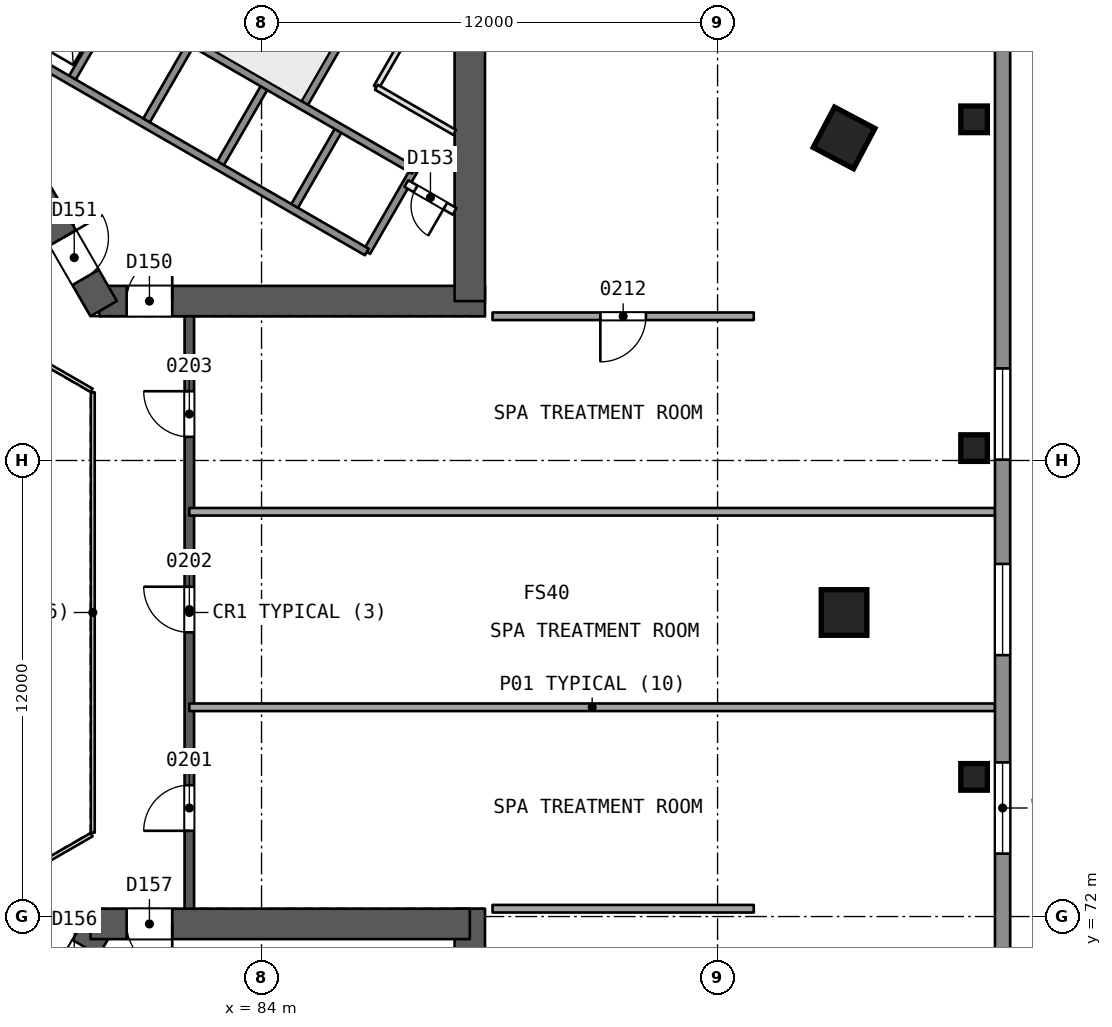
"""IFC4 building model, lengths in metres.
Left out: names, types, materials, properties, quantities, classifications, styles, units other than length and angle.
Written with IfcOpenShell. Run it as: python <this file> out.ifc"""

import sys

from ifc_helpers import new_model, si_unit, direction, frame, frame_2d, origin, origin_2d, place, context, subcontext, project, spatial, rectangle, extrude, element, fill, save


model = new_model("IFC4")
c1 = context("Model", 3, precision=1e-05, world=origin(), true_north=direction((0.0, 1.0)))
c2 = subcontext(c1, "Body", "Model", "MODEL_VIEW")
j1 = project(units=[si_unit("LENGTHUNIT", "METRE"), si_unit("PLANEANGLEUNIT", "RADIAN")], contexts=[c1])
p1 = place(None, origin())
s1 = spatial("IfcSite", under=j1, at=p1, CompositionType="ELEMENT")
p2 = place(p1, origin())
s2 = spatial("IfcBuilding", under=s1, at=p2, CompositionType="ELEMENT")
p3 = place(p2, frame((0.0, 0.0, 15.0)))
s3 = spatial("IfcBuildingStorey", under=s2, at=p3, CompositionType="ELEMENT", Elevation=15.0)
p4 = place(p3, frame((79.731, 88.194, 0.0), z_axis=(0.0, 0.0, 1.0), x_axis=(1.0, 0.0, 0.0)))
e1 = element("IfcWall", 1, at=p4, inside=s3, PredefinedType="SHEAR", context=c2, shape_type="SweptSolid", body=[
    extrude(rectangle(XDim=10.149, YDim=0.8, at=frame_2d((5.074, 0.0))), origin(), (0.0, 0.0, 1.0), 5.4),
])
p5 = place(p4, frame((0.719, 0.0, 0.0)))
e2 = element("IfcOpeningElement", 2, at=p5, cuts=e1, PredefinedType="OPENING", context=c2, shape_type="SweptSolid", body=[
    extrude(rectangle(XDim=1.2, YDim=2.1, at=frame_2d((0.6, 1.05))), frame((0.0, 0.411, 0.0), z_axis=(0.0, -1.0, 0.0), x_axis=(1.0, 0.0, 0.0)), (0.0, 0.0, 1.0), 0.821),
])
p6 = place(p3, frame((89.48, 88.194, 0.0), z_axis=(0.0, 0.0, 1.0), x_axis=(0.0, 1.0, 0.0)))
e3 = element("IfcWall", 3, at=p6, inside=s3, PredefinedType="SHEAR", context=c2, shape_type="SweptSolid", body=[
    extrude(rectangle(XDim=13.933, YDim=0.8, at=frame_2d((6.967, 0.0))), origin(), (0.0, 0.0, 1.0), 5.4),
])
p7 = place(p3, frame((74.856, 96.637, 0.0), z_axis=(0.0, 0.0, 1.0), x_axis=(0.499993500917, -0.866029155999, 0.0)))
e4 = element("IfcWall", 4, at=p7, inside=s3, PredefinedType="SHEAR", context=c2, shape_type="SweptSolid", body=[
    extrude(rectangle(XDim=9.98, YDim=0.8, at=frame_2d((4.99, 0.0))), origin(), (0.0, 0.0, 1.0), 5.4),
])
p8 = place(p7, frame((7.83, 0.0, 0.0)))
e5 = element("IfcOpeningElement", 5, at=p8, cuts=e4, PredefinedType="OPENING", context=c2, shape_type="SweptSolid", body=[
    extrude(rectangle(XDim=1.2, YDim=2.1, at=frame_2d((0.6, 1.05))), frame((0.0, 0.411, 0.0), z_axis=(0.0, -1.0, 0.0), x_axis=(1.0, 0.0, 0.0)), (0.0, 0.0, 1.0), 0.821),
])
p9 = place(p3, frame((79.731, 71.806, 0.0), z_axis=(0.0, 0.0, 1.0), x_axis=(-0.49999662545, -0.866027352073, 0.0)))
e6 = element("IfcWall", 6, at=p9, inside=s3, PredefinedType="SHEAR", context=c2, shape_type="SweptSolid", body=[
    extrude(rectangle(XDim=10.149, YDim=0.8, at=frame_2d((5.074, 0.0))), origin(), (0.0, 0.0, 1.0), 5.4),
])
p10 = place(p9, frame((0.719, 0.0, 0.0)))
e7 = element("IfcOpeningElement", 7, at=p10, cuts=e6, PredefinedType="OPENING", context=c2, shape_type="SweptSolid", body=[
    extrude(rectangle(XDim=1.2, YDim=2.1, at=frame_2d((0.6, 1.05))), frame((0.0, 0.411, 0.0), z_axis=(0.0, -1.0, 0.0), x_axis=(1.0, 0.0, 0.0)), (0.0, 0.0, 1.0), 0.821),
])
p11 = place(p3, frame((89.48, 58.103, 0.0), z_axis=(0.0, 0.0, 1.0), x_axis=(0.0, 1.0, 0.0)))
e8 = element("IfcWall", 8, at=p11, inside=s3, PredefinedType="SHEAR", context=c2, shape_type="SweptSolid", body=[
    extrude(rectangle(XDim=14.103, YDim=0.8, at=frame_2d((7.051, 0.0))), origin(), (0.0, 0.0, 1.0), 5.4),
])
p12 = place(p3, frame((89.48, 71.806, 0.0), z_axis=(0.0, 0.0, 1.0), x_axis=(-1.0, 0.0, 0.0)))
e9 = element("IfcWall", 9, at=p12, inside=s3, PredefinedType="SHEAR", context=c2, shape_type="SweptSolid", body=[
    extrude(rectangle(XDim=9.98, YDim=0.8, at=frame_2d((4.99, 0.0))), origin(), (0.0, 0.0, 1.0), 5.4),
])
p13 = place(p12, frame((7.83, 0.0, 0.0)))
e10 = element("IfcOpeningElement", 10, at=p13, cuts=e9, PredefinedType="OPENING", context=c2, shape_type="SweptSolid", body=[
    extrude(rectangle(XDim=1.2, YDim=2.1, at=frame_2d((0.6, 1.05))), frame((0.0, 0.411, 0.0), z_axis=(0.0, -1.0, 0.0), x_axis=(1.0, 0.0, 0.0)), (0.0, 0.0, 1.0), 0.821),
])
p14 = place(p3, frame((82.1, 72.206, 0.0), z_axis=(0.0, 0.0, 1.0), x_axis=(0.0, 1.0, 0.0)))
e11 = element("IfcWall", 11, at=p14, inside=s3, PredefinedType="SHEAR", context=c2, shape_type="SweptSolid", body=[
    extrude(rectangle(XDim=15.588, YDim=0.25, at=frame_2d((7.794, 0.0))), origin(), (0.0, 0.0, 1.0), 5.0),
])
p15 = place(p14, frame((2.05, 0.0, 0.0)))
e12 = element("IfcOpeningElement", 12, at=p15, cuts=e11, PredefinedType="OPENING", context=c2, shape_type="SweptSolid", body=[
    extrude(rectangle(XDim=1.2, YDim=2.4, at=frame_2d((0.6, 1.2))), frame((0.0, 0.135, 0.0), z_axis=(0.0, -1.0, 0.0), x_axis=(1.0, 0.0, 0.0)), (0.0, 0.0, 1.0), 0.271),
])
p16 = place(p14, frame((7.272, 0.0, 0.0)))
e13 = element("IfcOpeningElement", 13, at=p16, cuts=e11, PredefinedType="OPENING", context=c2, shape_type="SweptSolid", body=[
    extrude(rectangle(XDim=1.2, YDim=2.4, at=frame_2d((0.6, 1.2))), frame((0.0, 0.135, 0.0), z_axis=(0.0, -1.0, 0.0), x_axis=(1.0, 0.0, 0.0)), (0.0, 0.0, 1.0), 0.271),
])
p17 = place(p14, frame((12.417, 0.0, 0.0)))
e14 = element("IfcOpeningElement", 14, at=p17, cuts=e11, PredefinedType="OPENING", context=c2, shape_type="SweptSolid", body=[
    extrude(rectangle(XDim=1.2, YDim=2.4, at=frame_2d((0.6, 1.2))), frame((0.0, 0.135, 0.0), z_axis=(0.0, -1.0, 0.0), x_axis=(1.0, 0.0, 0.0)), (0.0, 0.0, 1.0), 0.271),
])
p18 = place(p3, frame((99.353, 80.0, 0.0), z_axis=(-0.020160473534, 0.0, 0.999796757), x_axis=(0.0, -1.0, 0.0)))
e15 = element("IfcColumn", 15, at=p18, inside=s3, PredefinedType="COLUMN", context=c2, shape_type="SweptSolid", body=[
    extrude(rectangle(XDim=1.2, YDim=1.2, at=origin_2d()), origin(), (0.0, 0.0, 1.0), 5.401),
])
p19 = place(p3, frame((99.353, 92.5, 0.0), z_axis=(-0.020159326465, -0.010667266919, 0.999739871653), x_axis=(0.999796447908, 0.00060008046, 0.020166870185)))
e16 = element("IfcColumn", 16, at=p19, inside=s3, PredefinedType="COLUMN", context=c2, shape_type="SweptSolid", body=[
    extrude(rectangle(XDim=1.2, YDim=1.2, at=origin_2d()), origin(), (0.0, 0.0, 1.0), 5.401),
])
for number, where, z_axis, x_axis in (
    (17, (102.75, 75.674, 0.0), (0.0, 0.0, 1.0), (1.0, 0.0, 0.0)),
    (18, (102.75, 84.326, 0.0), (0.0, 0.0, 1.0), (1.0, 0.0, 0.0)),
    (19, (102.75, 92.977, 0.0), (0.0, 0.0, 1.0), (1.0, 0.0, 0.0)),
):
    element("IfcColumn", number, at=place(p3, frame(where, z_axis=z_axis, x_axis=x_axis)), inside=s3, PredefinedType="COLUMN", context=c2, shape_type="SweptSolid", body=[
        extrude(rectangle(XDim=0.7, YDim=0.7, at=origin_2d()), origin(), (0.0, 0.0, 1.0), 5.4),
    ])
p20 = place(p3, frame((103.301, 77.506, 0.0), z_axis=(0.0, 0.0, 1.0), x_axis=(-1.0, 0.0, 0.0)))
e20 = element("IfcWall", 20, at=p20, inside=s3, PredefinedType="PARTITIONING", context=c2, shape_type="SweptSolid", body=[
    extrude(rectangle(XDim=21.201, YDim=0.2, at=frame_2d((10.601, 0.0))), origin(), (0.0, 0.0, 1.0), 5.0),
])
p21 = place(p3, frame((90.079, 72.206, 0.0), z_axis=(0.0, 0.0, 1.0), x_axis=(1.0, 0.0, 0.0)))
e21 = element("IfcWall", 21, at=p21, inside=s3, PredefinedType="PARTITIONING", context=c2, shape_type="SweptSolid", body=[
    extrude(rectangle(XDim=6.874, YDim=0.2, at=frame_2d((3.437, 0.0))), origin(), (0.0, 0.0, 1.0), 5.0),
])
p22 = place(p3, frame((103.301, 82.65, 0.0), z_axis=(0.0, 0.0, 1.0), x_axis=(-1.0, 0.0, 0.0)))
e22 = element("IfcWall", 22, at=p22, inside=s3, PredefinedType="PARTITIONING", context=c2, shape_type="SweptSolid", body=[
    extrude(rectangle(XDim=21.201, YDim=0.2, at=frame_2d((10.601, 0.0))), origin(), (0.0, 0.0, 1.0), 5.0),
])
p23 = place(p3, frame((96.953, 87.794, 0.0), z_axis=(0.0, 0.0, 1.0), x_axis=(-1.0, 0.0, 0.0)))
e23 = element("IfcWall", 23, at=p23, inside=s3, PredefinedType="PARTITIONING", context=c2, shape_type="SweptSolid", body=[
    extrude(rectangle(XDim=6.874, YDim=0.2, at=frame_2d((3.437, 0.0))), origin(), (0.0, 0.0, 1.0), 5.0),
])
p24 = place(p23, frame((2.837, 0.0, 0.0)))
e24 = element("IfcOpeningElement", 24, at=p24, cuts=e23, PredefinedType="OPENING", context=c2, shape_type="SweptSolid", body=[
    extrude(rectangle(XDim=1.2, YDim=2.4, at=frame_2d((0.6, 1.2))), frame((0.0, 0.11, 0.0), z_axis=(0.0, -1.0, 0.0), x_axis=(1.0, 0.0, 0.0)), (0.0, 0.0, 1.0), 0.221),
])
p25 = place(p3, frame((103.5, 119.364, 0.0), z_axis=(0.0, 0.0, 1.0), x_axis=(0.0, -1.0, 0.0)))
e25 = element("IfcWall", 25, at=p25, inside=s3, PredefinedType="SOLIDWALL", context=c2, shape_type="SweptSolid", body=[
    extrude(rectangle(XDim=78.727, YDim=0.4, at=frame_2d((39.364, 0.0))), origin(), (0.0, 0.0, 1.0), 5.0),
])
p26 = place(p25, frame((43.308, 0.0, 0.9)))
e26 = element("IfcOpeningElement", 26, at=p26, cuts=e25, PredefinedType="OPENING", context=c2, shape_type="SweptSolid", body=[
    extrude(rectangle(XDim=2.4, YDim=2.4, at=frame_2d((1.2, 1.2))), frame((0.0, 0.21, 0.0), z_axis=(0.0, -1.0, 0.0), x_axis=(1.0, 0.0, 0.0)), (0.0, 0.0, 1.0), 0.421),
])
p27 = place(p25, frame((38.085, 0.0, 0.9)))
e27 = element("IfcOpeningElement", 27, at=p27, cuts=e25, PredefinedType="OPENING", context=c2, shape_type="SweptSolid", body=[
    extrude(rectangle(XDim=2.4, YDim=2.4, at=frame_2d((1.2, 1.2))), frame((0.0, 0.21, 0.0), z_axis=(0.0, -1.0, 0.0), x_axis=(1.0, 0.0, 0.0)), (0.0, 0.0, 1.0), 0.421),
])
p28 = place(p25, frame((32.941, 0.0, 0.9)))
e28 = element("IfcOpeningElement", 28, at=p28, cuts=e25, PredefinedType="OPENING", context=c2, shape_type="SweptSolid", body=[
    extrude(rectangle(XDim=2.4, YDim=2.4, at=frame_2d((1.2, 1.2))), frame((0.0, 0.21, 0.0), z_axis=(0.0, -1.0, 0.0), x_axis=(1.0, 0.0, 0.0)), (0.0, 0.0, 1.0), 0.421),
])
p29 = place(p3, frame((26.66, 85.0, 0.0), z_axis=(0.0, 0.0, 1.0), x_axis=(0.866025599265, 0.499999661418, 0.0)))
e29 = element("IfcWall", 29, at=p29, inside=s3, PredefinedType="SOLIDWALL", context=c2, shape_type="SweptSolid", body=[
    extrude(rectangle(XDim=78.727, YDim=0.4, at=frame_2d((39.364, 0.0))), origin(), (0.0, 0.0, 1.0), 5.0),
])
p30 = place(p29, frame((42.061, 0.0, 0.9)))
e30 = element("IfcOpeningElement", 30, at=p30, cuts=e29, PredefinedType="OPENING", context=c2, shape_type="SweptSolid", body=[
    extrude(rectangle(XDim=2.4, YDim=2.4, at=frame_2d((1.2, 1.2))), frame((0.0, 0.21, 0.0), z_axis=(0.0, -1.0, 0.0), x_axis=(1.0, 0.0, 0.0)), (0.0, 0.0, 1.0), 0.421),
])
p31 = place(p29, frame((34.267, 0.0, 0.9)))
e31 = element("IfcOpeningElement", 31, at=p31, cuts=e29, PredefinedType="OPENING", context=c2, shape_type="SweptSolid", body=[
    extrude(rectangle(XDim=2.4, YDim=2.4, at=frame_2d((1.2, 1.2))), frame((0.0, 0.21, 0.0), z_axis=(0.0, -1.0, 0.0), x_axis=(1.0, 0.0, 0.0)), (0.0, 0.0, 1.0), 0.421),
])
p32 = place(p3, frame((94.84, 35.636, 0.0), z_axis=(0.0, 0.0, 1.0), x_axis=(-0.866025599265, 0.499999661418, 0.0)))
e32 = element("IfcWall", 32, at=p32, inside=s3, PredefinedType="SOLIDWALL", context=c2, shape_type="SweptSolid", body=[
    extrude(rectangle(XDim=78.727, YDim=0.4, at=frame_2d((39.364, 0.0))), origin(), (0.0, 0.0, 1.0), 5.0),
])
p33 = place(p32, frame((42.061, 0.0, 0.9)))
e33 = element("IfcOpeningElement", 33, at=p33, cuts=e32, PredefinedType="OPENING", context=c2, shape_type="SweptSolid", body=[
    extrude(rectangle(XDim=2.4, YDim=2.4, at=frame_2d((1.2, 1.2))), frame((0.0, 0.21, 0.0), z_axis=(0.0, -1.0, 0.0), x_axis=(1.0, 0.0, 0.0)), (0.0, 0.0, 1.0), 0.421),
])
p34 = place(p3, frame((86.77, 89.486, 0.0), z_axis=(0.0, 0.0, 1.0), x_axis=(0.499961042966, 0.86604789447, 0.0)))
e34 = element("IfcWall", 34, at=p34, inside=s3, PredefinedType="SOLIDWALL", context=c2, shape_type="SweptSolid", body=[
    extrude(rectangle(XDim=2.48, YDim=0.2, at=frame_2d((1.24, 0.0))), origin(), (0.0, 0.0, 1.0), 5.0),
])
p35 = place(p3, frame((87.021, 93.821, 0.0), z_axis=(0.0, 0.0, 1.0), x_axis=(0.500028662945, 0.866008854593, 0.0)))
e35 = element("IfcWall", 35, at=p35, inside=s3, PredefinedType="PARTITIONING", context=c2, shape_type="SweptSolid", body=[
    extrude(rectangle(XDim=4.118, YDim=0.15, at=frame_2d((2.059, 0.0))), origin(), (0.0, 0.0, 1.0), 5.0),
])
p36 = place(p35, frame((1.582, 0.0, 0.0)))
e36 = element("IfcOpeningElement", 36, at=p36, cuts=e35, PredefinedType="OPENING", context=c2, shape_type="SweptSolid", body=[
    extrude(rectangle(XDim=0.9, YDim=2.1, at=frame_2d((0.45, 1.05))), frame((0.0, 0.085, 0.0), z_axis=(0.0, -1.0, 0.0), x_axis=(1.0, 0.0, 0.0)), (0.0, 0.0, 1.0), 0.171),
])
p37 = place(p3, frame((84.821, 90.611, 0.0), z_axis=(0.0, 0.0, 1.0), x_axis=(0.499961042966, 0.86604789447, 0.0)))
e37 = element("IfcWall", 37, at=p37, inside=s3, PredefinedType="SOLIDWALL", context=c2, shape_type="SweptSolid", body=[
    extrude(rectangle(XDim=2.48, YDim=0.2, at=frame_2d((1.24, 0.0))), origin(), (0.0, 0.0, 1.0), 5.0),
])
p38 = place(p3, frame((85.087, 93.321, 0.0), z_axis=(0.0, 0.0, 1.0), x_axis=(0.500019787375, 0.866013979237, 0.0)))
e38 = element("IfcWall", 38, at=p38, inside=s3, PredefinedType="SOLIDWALL", context=c2, shape_type="SweptSolid", body=[
    extrude(rectangle(XDim=7.7, YDim=0.2, at=frame_2d((3.85, 0.0))), origin(), (0.0, 0.0, 1.0), 5.0),
])
for number, where, z_axis, x_axis in (
    (39, (82.873, 91.736, 0.0), (0.0, 0.0, 1.0), (0.5, 0.866, 0.0)),
    (40, (80.924, 92.861, 0.0), (0.0, 0.0, 1.0), (0.5, 0.866, 0.0)),
):
    element("IfcWall", number, at=place(p3, frame(where, z_axis=z_axis, x_axis=x_axis)), inside=s3, PredefinedType="SOLIDWALL", context=c2, shape_type="SweptSolid", body=[
        extrude(rectangle(XDim=2.48, YDim=0.2, at=frame_2d((1.24, 0.0))), origin(), (0.0, 0.0, 1.0), 5.0),
    ])
p39 = place(p3, frame((78.976, 93.986, 0.0), z_axis=(0.0, 0.0, 1.0), x_axis=(0.499944174705, 0.866057632134, 0.0)))
e41 = element("IfcWall", 41, at=p39, inside=s3, PredefinedType="SOLIDWALL", context=c2, shape_type="SweptSolid", body=[
    extrude(rectangle(XDim=3.05, YDim=0.2, at=frame_2d((1.525, 0.0))), origin(), (0.0, 0.0, 1.0), 5.0),
])
p40 = place(p3, frame((86.77, 89.486, 0.0), z_axis=(0.0, 0.0, 1.0), x_axis=(-0.86601811187, 0.500012629753, 0.0)))
e42 = element("IfcWall", 42, at=p40, inside=s3, PredefinedType="SOLIDWALL", context=c2, shape_type="SweptSolid", body=[
    extrude(rectangle(XDim=10.9, YDim=0.2, at=frame_2d((5.45, 0.0))), origin(), (0.0, 0.0, 1.0), 5.0),
])
p41 = place(p3, frame((89.08, 90.554, 0.0), z_axis=(0.0, 0.0, 1.0), x_axis=(-0.866022048785, 0.500005810984, 0.0)))
e43 = element("IfcWall", 43, at=p41, inside=s3, PredefinedType="PARTITIONING", context=c2, shape_type="SweptSolid", body=[
    extrude(rectangle(XDim=1.467, YDim=0.2, at=frame_2d((0.733, 0.0))), origin(), (0.0, 0.0, 1.0), 5.0),
])
p42 = place(p41, frame((0.283, 0.0, 0.0)))
e44 = element("IfcOpeningElement", 44, at=p42, cuts=e43, PredefinedType="OPENING", context=c2, shape_type="SweptSolid", body=[
    extrude(rectangle(XDim=0.9, YDim=2.1, at=frame_2d((0.45, 1.05))), frame((0.0, 0.11, 0.0), z_axis=(0.0, -1.0, 0.0), x_axis=(1.0, 0.0, 0.0)), (0.0, 0.0, 1.0), 0.221),
])
p43 = place(p3, frame((88.01, 91.634, 0.0), z_axis=(0.0, 0.0, 1.0), x_axis=(-0.866024315419, 0.5000018851, 0.0)))
e45 = element("IfcWall", 45, at=p43, inside=s3, PredefinedType="SOLIDWALL", context=c2, shape_type="SweptSolid", body=[
    extrude(rectangle(XDim=9.0, YDim=0.2, at=frame_2d((4.5, 0.0))), origin(), (0.0, 0.0, 1.0), 5.0),
])
p44 = place(p3, frame((89.08, 92.632, 0.0), z_axis=(0.0, 0.0, 1.0), x_axis=(-0.866041951395, 0.499971337603, 0.0)))
e46 = element("IfcWall", 46, at=p44, inside=s3, PredefinedType="PARTITIONING", context=c2, shape_type="SweptSolid", body=[
    extrude(rectangle(XDim=2.378, YDim=0.15, at=frame_2d((1.189, 0.0))), origin(), (0.0, 0.0, 1.0), 5.0),
])
p45 = place(p3, frame((79.56, 74.206, 0.0), z_axis=(0.0, 0.0, 1.0), x_axis=(0.0, 1.0, 0.0)))
e47 = element("IfcWall", 47, at=p45, inside=s3, PredefinedType="PARTITIONING", context=c2, shape_type="SweptSolid", body=[
    extrude(rectangle(XDim=11.588, YDim=0.1, at=frame_2d((5.794, 0.0))), origin(), (0.0, 0.0, 1.0), 5.0),
])
for number, where, z_axis, x_axis in (
    (48, (79.53, 85.846, 0.0), (0.0, 0.0, 1.0), (-0.866, 0.5, 0.0)),
    (49, (77.798, 73.154, 0.0), (0.0, 0.0, 1.0), (0.866, 0.5, 0.0)),
):
    element("IfcWall", number, at=place(p3, frame(where, z_axis=z_axis, x_axis=x_axis)), inside=s3, PredefinedType="PARTITIONING", context=c2, shape_type="SweptSolid", body=[
        extrude(rectangle(XDim=2.0, YDim=0.1, at=frame_2d((1.0, 0.0))), origin(), (0.0, 0.0, 1.0), 5.0),
    ])
p46 = place(p15, origin())
e50 = element("IfcDoor", 50, at=p46, inside=s3, OperationType="SINGLE_SWING_LEFT", PredefinedType="NOTDEFINED", context=c2, shape_type="SweptSolid", body=[
    extrude(rectangle(XDim=1.2, YDim=2.4, at=frame_2d((0.6, 1.2))), frame((0.0, 0.025, 0.0), z_axis=(0.0, -1.0, 0.0), x_axis=(1.0, 0.0, 0.0)), (0.0, 0.0, 1.0), 0.05),
])
fill(e12, e50)
p47 = place(p16, origin())
e51 = element("IfcDoor", 51, at=p47, inside=s3, OperationType="SINGLE_SWING_RIGHT", PredefinedType="NOTDEFINED", context=c2, shape_type="SweptSolid", body=[
    extrude(rectangle(XDim=1.2, YDim=2.4, at=frame_2d((0.6, 1.2))), frame((0.0, 0.025, 0.0), z_axis=(0.0, -1.0, 0.0), x_axis=(1.0, 0.0, 0.0)), (0.0, 0.0, 1.0), 0.05),
])
fill(e13, e51)
p48 = place(p17, origin())
e52 = element("IfcDoor", 52, at=p48, inside=s3, OperationType="SINGLE_SWING_RIGHT", PredefinedType="NOTDEFINED", context=c2, shape_type="SweptSolid", body=[
    extrude(rectangle(XDim=1.2, YDim=2.4, at=frame_2d((0.6, 1.2))), frame((0.0, 0.025, 0.0), z_axis=(0.0, -1.0, 0.0), x_axis=(1.0, 0.0, 0.0)), (0.0, 0.0, 1.0), 0.05),
])
fill(e14, e52)
p49 = place(p24, origin())
e53 = element("IfcDoor", 53, at=p49, inside=s3, OperationType="SINGLE_SWING_RIGHT", PredefinedType="NOTDEFINED", context=c2, shape_type="SweptSolid", body=[
    extrude(rectangle(XDim=1.2, YDim=2.4, at=frame_2d((0.6, 1.2))), frame((0.0, 0.025, 0.0), z_axis=(0.0, -1.0, 0.0), x_axis=(1.0, 0.0, 0.0)), (0.0, 0.0, 1.0), 0.05),
])
fill(e24, e53)
p50 = place(p26, origin())
e54 = element("IfcWindow", 54, at=p50, inside=s3, PartitioningType="SINGLE_PANEL", PredefinedType="WINDOW", context=c2, shape_type="SweptSolid", body=[
    extrude(rectangle(XDim=2.4, YDim=2.4, at=frame_2d((1.2, 1.2))), frame((0.0, 0.03, 0.0), z_axis=(0.0, -1.0, 0.0), x_axis=(1.0, 0.0, 0.0)), (0.0, 0.0, 1.0), 0.06),
])
fill(e26, e54)
p51 = place(p27, origin())
e55 = element("IfcWindow", 55, at=p51, inside=s3, PartitioningType="SINGLE_PANEL", PredefinedType="WINDOW", context=c2, shape_type="SweptSolid", body=[
    extrude(rectangle(XDim=2.4, YDim=2.4, at=frame_2d((1.2, 1.2))), frame((0.0, 0.03, 0.0), z_axis=(0.0, -1.0, 0.0), x_axis=(1.0, 0.0, 0.0)), (0.0, 0.0, 1.0), 0.06),
])
fill(e27, e55)
p52 = place(p28, origin())
e56 = element("IfcWindow", 56, at=p52, inside=s3, PartitioningType="SINGLE_PANEL", PredefinedType="WINDOW", context=c2, shape_type="SweptSolid", body=[
    extrude(rectangle(XDim=2.4, YDim=2.4, at=frame_2d((1.2, 1.2))), frame((0.0, 0.03, 0.0), z_axis=(0.0, -1.0, 0.0), x_axis=(1.0, 0.0, 0.0)), (0.0, 0.0, 1.0), 0.06),
])
fill(e28, e56)
p53 = place(p5, origin())
e57 = element("IfcDoor", 57, at=p53, inside=s3, OperationType="SINGLE_SWING_RIGHT", PredefinedType="NOTDEFINED", context=c2, shape_type="SweptSolid", body=[
    extrude(rectangle(XDim=1.2, YDim=2.1, at=frame_2d((0.6, 1.05))), frame((0.0, 0.025, 0.0), z_axis=(0.0, -1.0, 0.0), x_axis=(1.0, 0.0, 0.0)), (0.0, 0.0, 1.0), 0.05),
])
fill(e2, e57)
p54 = place(p8, origin())
e58 = element("IfcDoor", 58, at=p54, inside=s3, OperationType="SINGLE_SWING_LEFT", PredefinedType="NOTDEFINED", context=c2, shape_type="SweptSolid", body=[
    extrude(rectangle(XDim=1.2, YDim=2.1, at=frame_2d((0.6, 1.05))), frame((0.0, 0.025, 0.0), z_axis=(0.0, -1.0, 0.0), x_axis=(1.0, 0.0, 0.0)), (0.0, 0.0, 1.0), 0.05),
])
fill(e5, e58)
p55 = place(p42, origin())
e59 = element("IfcDoor", 59, at=p55, inside=s3, OperationType="SINGLE_SWING_LEFT", PredefinedType="NOTDEFINED", context=c2, shape_type="SweptSolid", body=[
    extrude(rectangle(XDim=0.9, YDim=2.1, at=frame_2d((0.45, 1.05))), frame((0.0, 0.025, 0.0), z_axis=(0.0, -1.0, 0.0), x_axis=(1.0, 0.0, 0.0)), (0.0, 0.0, 1.0), 0.05),
])
fill(e44, e59)
p56 = place(p13, origin())
e60 = element("IfcDoor", 60, at=p56, inside=s3, OperationType="SINGLE_SWING_LEFT", PredefinedType="NOTDEFINED", context=c2, shape_type="SweptSolid", body=[
    extrude(rectangle(XDim=1.2, YDim=2.1, at=frame_2d((0.6, 1.05))), frame((0.0, 0.025, 0.0), z_axis=(0.0, -1.0, 0.0), x_axis=(1.0, 0.0, 0.0)), (0.0, 0.0, 1.0), 0.05),
])
fill(e10, e60)
save(model, sys.argv[1])
